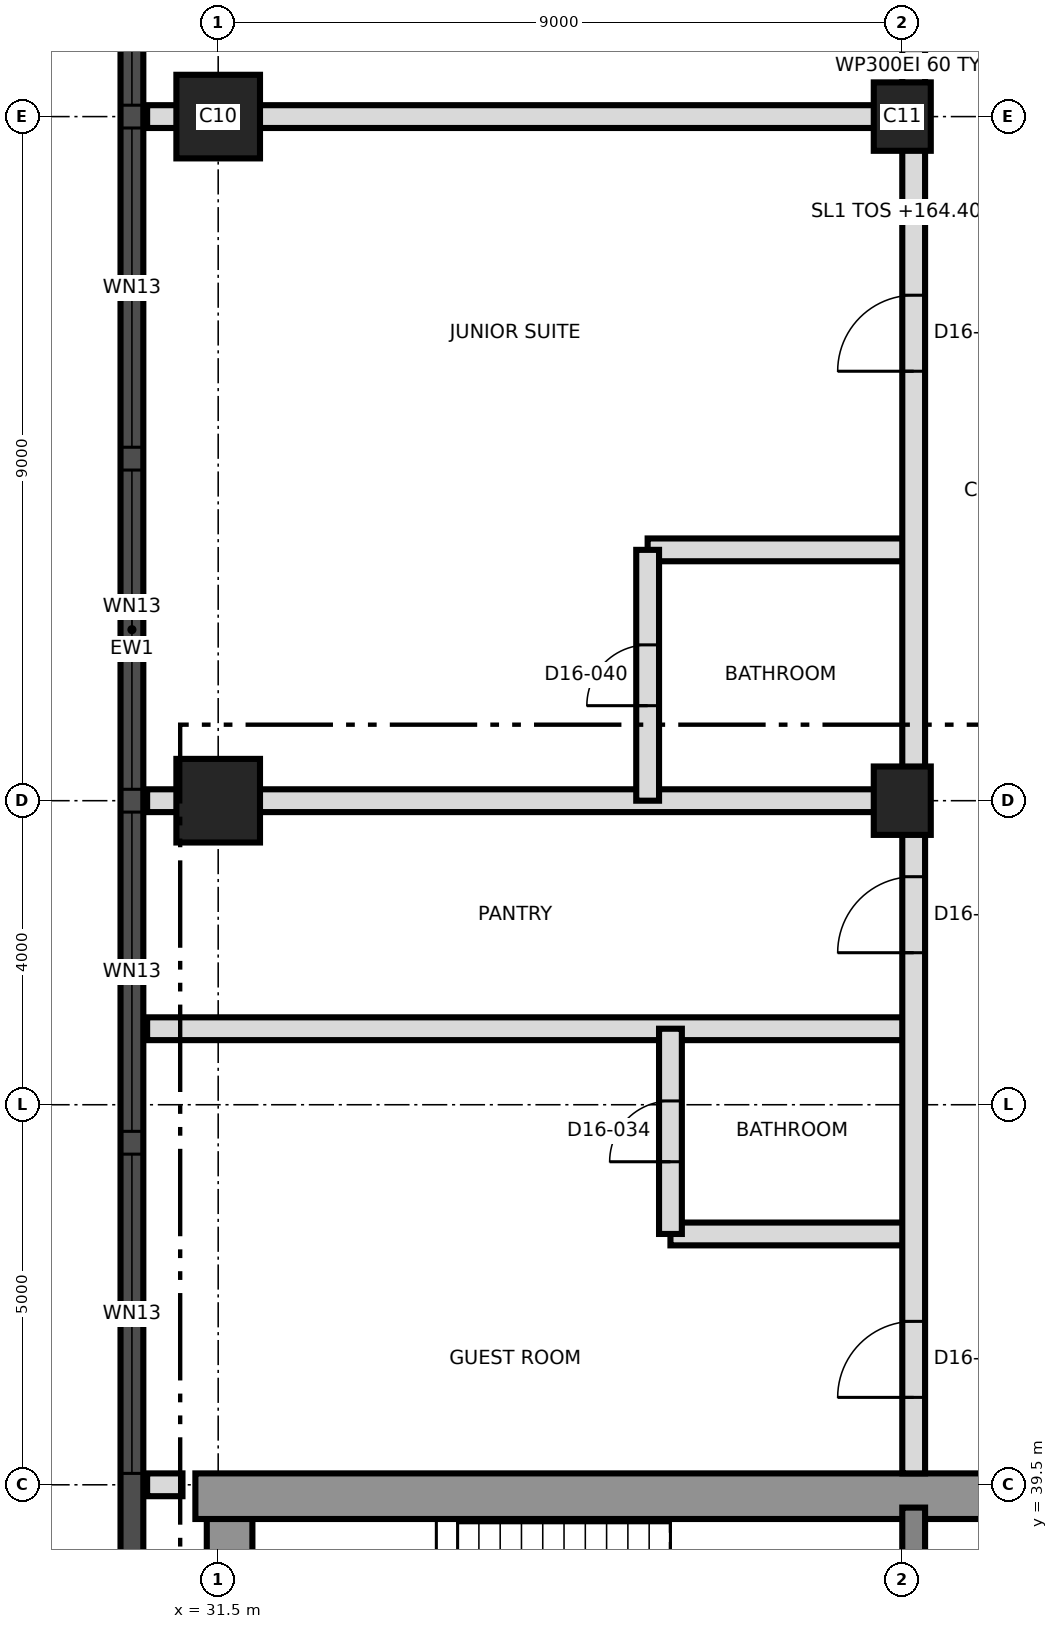
"""IFC4 building model, lengths in metres.
Left out: names, types, materials, properties, quantities, classifications, styles, units other than length and angle.
Written with IfcOpenShell. Run it as: python <this file> out.ifc"""

import sys

from ifc_helpers import new_model, si_unit, direction, frame, frame_2d, origin, origin_2d, place, context, subcontext, project, spatial, rectangle, extrude, element, fill, save


model = new_model("IFC4")
c1 = context("Model", 3, precision=1e-05, world=origin(), true_north=direction((0.0, 1.0)))
c2 = subcontext(c1, "Body", "Model", "MODEL_VIEW")
j1 = project(units=[si_unit("LENGTHUNIT", "METRE"), si_unit("PLANEANGLEUNIT", "RADIAN")], contexts=[c1])
p1 = place(None, origin())
s1 = spatial("IfcSite", under=j1, at=p1, CompositionType="ELEMENT")
p2 = place(p1, origin())
s2 = spatial("IfcBuilding", under=s1, at=p2, CompositionType="ELEMENT")
p3 = place(p2, frame((0.0, 0.0, 164.4)))
s3 = spatial("IfcBuildingStorey", under=s2, at=p3, CompositionType="ELEMENT", Elevation=164.4)
p4 = place(p3, frame((31.65, 21.8, 0.0), z_axis=(0.0, 0.0, 1.0), x_axis=(0.0, 1.0, 0.0)))
e1 = element("IfcWall", 1, at=p4, inside=s3, PredefinedType="SHEAR", context=c2, shape_type="SweptSolid", body=[
    extrude(rectangle(XDim=17.4, YDim=0.6, at=frame_2d((8.7, 0.0))), origin(), (0.0, 0.0, 1.0), 3.7),
])
p5 = place(p3, frame((31.2, 39.35, 0.0), z_axis=(0.0, 0.0, 1.0), x_axis=(1.0, 0.0, 0.0)))
e2 = element("IfcWall", 2, at=p5, inside=s3, PredefinedType="SHEAR", context=c2, shape_type="SweptSolid", body=[
    extrude(rectangle(XDim=27.0, YDim=0.6, at=frame_2d((13.5, 0.0))), origin(), (0.0, 0.0, 1.0), 3.7),
])
p6 = place(p5, frame((10.5, 0.0, 0.0)))
e3 = element("IfcOpeningElement", 3, at=p6, cuts=e2, PredefinedType="OPENING", context=c2, shape_type="SweptSolid", body=[
    extrude(rectangle(XDim=1.2, YDim=2.1, at=frame_2d((0.6, 1.05))), frame((0.0, 0.31, 0.0), z_axis=(0.0, -1.0, 0.0), x_axis=(1.0, 0.0, 0.0)), (0.0, 0.0, 1.0), 0.62),
])
p7 = place(p3, frame((40.65, 33.5, 0.0), z_axis=(0.0, 0.0, 1.0), x_axis=(0.0, 1.0, 0.0)))
e4 = element("IfcWall", 4, at=p7, inside=s3, PredefinedType="SHEAR", context=c2, shape_type="SweptSolid", body=[
    extrude(rectangle(XDim=5.7, YDim=0.3, at=frame_2d((2.85, 0.0))), origin(), (0.0, 0.0, 1.0), 3.7),
])
p8 = place(p3, frame((31.5, 48.5, 0.0), z_axis=(0.0, 0.0, 1.0), x_axis=(1.0, 0.0, 0.0)))
e5 = element("IfcColumn", 5, at=p8, inside=s3, PredefinedType="COLUMN", context=c2, shape_type="SweptSolid", body=[
    extrude(rectangle(XDim=1.1, YDim=1.1, at=origin_2d()), origin(), (0.0, 0.0, 1.0), 3.7),
])
p9 = place(p3, frame((40.5, 48.5, 0.0), z_axis=(0.0, 0.0, 1.0), x_axis=(0.0, 1.0, 0.0)))
e6 = element("IfcColumn", 6, at=p9, inside=s3, PredefinedType="COLUMN", context=c2, shape_type="SweptSolid", body=[
    extrude(rectangle(XDim=0.9, YDim=0.75, at=origin_2d()), origin(), (0.0, 0.0, 1.0), 3.7),
])
p10 = place(p3, frame((31.5, 57.5, 0.0), z_axis=(0.0, 0.0, 1.0), x_axis=(1.0, 0.0, 0.0)))
e7 = element("IfcColumn", 7, at=p10, inside=s3, PredefinedType="COLUMN", context=c2, shape_type="SweptSolid", body=[
    extrude(rectangle(XDim=1.1, YDim=1.1, at=origin_2d()), origin(), (0.0, 0.0, 1.0), 3.7),
])
p11 = place(p3, frame((40.5, 57.5, 0.0), z_axis=(0.0, 0.0, 1.0), x_axis=(0.0, 1.0, 0.0)))
e8 = element("IfcColumn", 8, at=p11, inside=s3, PredefinedType="COLUMN", context=c2, shape_type="SweptSolid", body=[
    extrude(rectangle(XDim=0.9, YDim=0.75, at=origin_2d()), origin(), (0.0, 0.0, 1.0), 3.7),
])
p12 = place(p3, frame((30.365, 66.992, 0.0), z_axis=(0.0, 0.0, 1.0), x_axis=(0.0, -1.0, 0.0)))
e9 = element("IfcWall", 9, at=p12, inside=s3, PredefinedType="SOLIDWALL", context=c2, shape_type="SweptSolid", body=[
    extrude(rectangle(XDim=32.981, YDim=0.3, at=frame_2d((16.491, 0.0))), origin(), (0.0, 0.0, 1.0), 3.4),
])
p13 = place(p12, frame((1.596, 0.0, 0.3)))
e10 = element("IfcOpeningElement", 10, at=p13, cuts=e9, PredefinedType="OPENING", context=c2, shape_type="SweptSolid", body=[
    extrude(rectangle(XDim=1.8, YDim=2.4, at=frame_2d((0.9, 1.2))), frame((0.0, 0.16, 0.0), z_axis=(0.0, -1.0, 0.0), x_axis=(1.0, 0.0, 0.0)), (0.0, 0.0, 1.0), 0.32),
])
p14 = place(p12, frame((5.142, 0.0, 0.9)))
e11 = element("IfcOpeningElement", 11, at=p14, cuts=e9, PredefinedType="OPENING", context=c2, shape_type="SweptSolid", body=[
    extrude(rectangle(XDim=4.2, YDim=1.7, at=frame_2d((2.1, 0.85))), frame((0.0, 0.16, 0.0), z_axis=(0.0, -1.0, 0.0), x_axis=(1.0, 0.0, 0.0)), (0.0, 0.0, 1.0), 0.32),
])
p15 = place(p12, frame((9.642, 0.0, 0.9)))
e12 = element("IfcOpeningElement", 12, at=p15, cuts=e9, PredefinedType="OPENING", context=c2, shape_type="SweptSolid", body=[
    extrude(rectangle(XDim=4.2, YDim=1.7, at=frame_2d((2.1, 0.85))), frame((0.0, 0.16, 0.0), z_axis=(0.0, -1.0, 0.0), x_axis=(1.0, 0.0, 0.0)), (0.0, 0.0, 1.0), 0.32),
])
p16 = place(p12, frame((14.142, 0.0, 0.9)))
e13 = element("IfcOpeningElement", 13, at=p16, cuts=e9, PredefinedType="OPENING", context=c2, shape_type="SweptSolid", body=[
    extrude(rectangle(XDim=4.2, YDim=1.7, at=frame_2d((2.1, 0.85))), frame((0.0, 0.16, 0.0), z_axis=(0.0, -1.0, 0.0), x_axis=(1.0, 0.0, 0.0)), (0.0, 0.0, 1.0), 0.32),
])
p17 = place(p12, frame((18.642, 0.0, 0.9)))
e14 = element("IfcOpeningElement", 14, at=p17, cuts=e9, PredefinedType="OPENING", context=c2, shape_type="SweptSolid", body=[
    extrude(rectangle(XDim=4.2, YDim=1.7, at=frame_2d((2.1, 0.85))), frame((0.0, 0.16, 0.0), z_axis=(0.0, -1.0, 0.0), x_axis=(1.0, 0.0, 0.0)), (0.0, 0.0, 1.0), 0.32),
])
p18 = place(p12, frame((23.142, 0.0, 0.9)))
e15 = element("IfcOpeningElement", 15, at=p18, cuts=e9, PredefinedType="OPENING", context=c2, shape_type="SweptSolid", body=[
    extrude(rectangle(XDim=4.2, YDim=1.7, at=frame_2d((2.1, 0.85))), frame((0.0, 0.16, 0.0), z_axis=(0.0, -1.0, 0.0), x_axis=(1.0, 0.0, 0.0)), (0.0, 0.0, 1.0), 0.32),
])
p19 = place(p12, frame((29.337, 0.0, 0.3)))
e16 = element("IfcOpeningElement", 16, at=p19, cuts=e9, PredefinedType="OPENING", context=c2, shape_type="SweptSolid", body=[
    extrude(rectangle(XDim=1.8, YDim=2.4, at=frame_2d((0.9, 1.2))), frame((0.0, 0.16, 0.0), z_axis=(0.0, -1.0, 0.0), x_axis=(1.0, 0.0, 0.0)), (0.0, 0.0, 1.0), 0.32),
])
p20 = place(p3, frame((30.565, 39.5, 0.0), z_axis=(0.0, 0.0, 1.0), x_axis=(1.0, 0.0, 0.0)))
e17 = element("IfcWall", 17, at=p20, inside=s3, PredefinedType="PARTITIONING", context=c2, shape_type="SweptSolid", body=[
    extrude(rectangle(XDim=0.465, YDim=0.3, at=frame_2d((0.232, 0.0))), origin(), (0.0, 0.0, 1.0), 3.4),
])
p21 = place(p3, frame((37.45, 42.8, 0.0), z_axis=(0.0, 0.0, 1.0), x_axis=(1.0, 0.0, 0.0)))
e18 = element("IfcWall", 18, at=p21, inside=s3, PredefinedType="PARTITIONING", context=c2, shape_type="SweptSolid", body=[
    extrude(rectangle(XDim=3.2, YDim=0.3, at=frame_2d((1.6, 0.0))), origin(), (0.0, 0.0, 1.0), 3.4),
])
for number, where, z_axis, x_axis in (
    (19, (30.565, 45.5, 0.0), (0.0, 0.0, 1.0), (1.0, 0.0, 0.0)),
    (20, (30.565, 48.5, 0.0), (0.0, 0.0, 1.0), (1.0, 0.0, 0.0)),
):
    element("IfcWall", number, at=place(p3, frame(where, z_axis=z_axis, x_axis=x_axis)), inside=s3, PredefinedType="PARTITIONING", context=c2, shape_type="SweptSolid", body=[
        extrude(rectangle(XDim=10.085, YDim=0.3, at=frame_2d((5.042, 0.0))), origin(), (0.0, 0.0, 1.0), 3.4),
    ])
p22 = place(p3, frame((37.15, 51.8, 0.0), z_axis=(0.0, 0.0, 1.0), x_axis=(1.0, 0.0, 0.0)))
e21 = element("IfcWall", 21, at=p22, inside=s3, PredefinedType="PARTITIONING", context=c2, shape_type="SweptSolid", body=[
    extrude(rectangle(XDim=3.5, YDim=0.3, at=frame_2d((1.75, 0.0))), origin(), (0.0, 0.0, 1.0), 3.4),
])
p23 = place(p3, frame((30.565, 57.5, 0.0), z_axis=(0.0, 0.0, 1.0), x_axis=(1.0, 0.0, 0.0)))
e22 = element("IfcWall", 22, at=p23, inside=s3, PredefinedType="PARTITIONING", context=c2, shape_type="SweptSolid", body=[
    extrude(rectangle(XDim=10.085, YDim=0.3, at=frame_2d((5.042, 0.0))), origin(), (0.0, 0.0, 1.0), 3.4),
])
p24 = place(p3, frame((37.15, 48.5, 0.0), z_axis=(0.0, 0.0, 1.0), x_axis=(0.0, 1.0, 0.0)))
e23 = element("IfcWall", 23, at=p24, inside=s3, PredefinedType="PARTITIONING", context=c2, shape_type="SweptSolid", body=[
    extrude(rectangle(XDim=3.3, YDim=0.3, at=frame_2d((1.65, 0.0))), origin(), (0.0, 0.0, 1.0), 3.4),
])
p25 = place(p24, frame((1.25, 0.0, 0.0)))
e24 = element("IfcOpeningElement", 24, at=p25, cuts=e23, PredefinedType="OPENING", context=c2, shape_type="SweptSolid", body=[
    extrude(rectangle(XDim=0.8, YDim=2.1, at=frame_2d((0.4, 1.05))), frame((0.0, 0.16, 0.0), z_axis=(0.0, -1.0, 0.0), x_axis=(1.0, 0.0, 0.0)), (0.0, 0.0, 1.0), 0.32),
])
p26 = place(p3, frame((37.45, 42.8, 0.0), z_axis=(0.0, 0.0, 1.0), x_axis=(0.0, 1.0, 0.0)))
e25 = element("IfcWall", 25, at=p26, inside=s3, PredefinedType="PARTITIONING", context=c2, shape_type="SweptSolid", body=[
    extrude(rectangle(XDim=2.7, YDim=0.3, at=frame_2d((1.35, 0.0))), origin(), (0.0, 0.0, 1.0), 3.4),
])
p27 = place(p26, frame((0.95, 0.0, 0.0)))
e26 = element("IfcOpeningElement", 26, at=p27, cuts=e25, PredefinedType="OPENING", context=c2, shape_type="SweptSolid", body=[
    extrude(rectangle(XDim=0.8, YDim=2.1, at=frame_2d((0.4, 1.05))), frame((0.0, 0.16, 0.0), z_axis=(0.0, -1.0, 0.0), x_axis=(1.0, 0.0, 0.0)), (0.0, 0.0, 1.0), 0.32),
])
p28 = place(p3, frame((40.65, 39.65, 0.0), z_axis=(0.0, 0.0, 1.0), x_axis=(0.0, 1.0, 0.0)))
e27 = element("IfcWall", 27, at=p28, inside=s3, PredefinedType="PARTITIONING", context=c2, shape_type="SweptSolid", body=[
    extrude(rectangle(XDim=37.025, YDim=0.3, at=frame_2d((18.513, 0.0))), origin(), (0.0, 0.0, 1.0), 3.4),
])
p29 = place(p28, frame((1.0, 0.0, 0.0)))
e28 = element("IfcOpeningElement", 28, at=p29, cuts=e27, PredefinedType="OPENING", context=c2, shape_type="SweptSolid", body=[
    extrude(rectangle(XDim=1.0, YDim=2.1, at=frame_2d((0.5, 1.05))), frame((0.0, 0.16, 0.0), z_axis=(0.0, -1.0, 0.0), x_axis=(1.0, 0.0, 0.0)), (0.0, 0.0, 1.0), 0.32),
])
p30 = place(p28, frame((6.85, 0.0, 0.0)))
e29 = element("IfcOpeningElement", 29, at=p30, cuts=e27, PredefinedType="OPENING", context=c2, shape_type="SweptSolid", body=[
    extrude(rectangle(XDim=1.0, YDim=2.1, at=frame_2d((0.5, 1.05))), frame((0.0, 0.16, 0.0), z_axis=(0.0, -1.0, 0.0), x_axis=(1.0, 0.0, 0.0)), (0.0, 0.0, 1.0), 0.32),
])
p31 = place(p28, frame((14.5, 0.0, 0.0)))
e30 = element("IfcOpeningElement", 30, at=p31, cuts=e27, PredefinedType="OPENING", context=c2, shape_type="SweptSolid", body=[
    extrude(rectangle(XDim=1.0, YDim=2.4, at=frame_2d((0.5, 1.2))), frame((0.0, 0.16, 0.0), z_axis=(0.0, -1.0, 0.0), x_axis=(1.0, 0.0, 0.0)), (0.0, 0.0, 1.0), 0.32),
])
p32 = place(p28, frame((21.35, 0.0, 0.0)))
e31 = element("IfcOpeningElement", 31, at=p32, cuts=e27, PredefinedType="OPENING", context=c2, shape_type="SweptSolid", body=[
    extrude(rectangle(XDim=1.0, YDim=2.4, at=frame_2d((0.5, 1.2))), frame((0.0, 0.16, 0.0), z_axis=(0.0, -1.0, 0.0), x_axis=(1.0, 0.0, 0.0)), (0.0, 0.0, 1.0), 0.32),
])
p33 = place(p14, origin())
e32 = element("IfcWindow", 32, at=p33, inside=s3, PartitioningType="SINGLE_PANEL", PredefinedType="WINDOW", context=c2, shape_type="SweptSolid", body=[
    extrude(rectangle(XDim=4.2, YDim=1.7, at=frame_2d((2.1, 0.85))), frame((0.0, 0.03, 0.0), z_axis=(0.0, -1.0, 0.0), x_axis=(1.0, 0.0, 0.0)), (0.0, 0.0, 1.0), 0.06),
])
fill(e11, e32)
p34 = place(p15, origin())
e33 = element("IfcWindow", 33, at=p34, inside=s3, PartitioningType="SINGLE_PANEL", PredefinedType="WINDOW", context=c2, shape_type="SweptSolid", body=[
    extrude(rectangle(XDim=4.2, YDim=1.7, at=frame_2d((2.1, 0.85))), frame((0.0, 0.03, 0.0), z_axis=(0.0, -1.0, 0.0), x_axis=(1.0, 0.0, 0.0)), (0.0, 0.0, 1.0), 0.06),
])
fill(e12, e33)
p35 = place(p16, origin())
e34 = element("IfcWindow", 34, at=p35, inside=s3, PartitioningType="SINGLE_PANEL", PredefinedType="WINDOW", context=c2, shape_type="SweptSolid", body=[
    extrude(rectangle(XDim=4.2, YDim=1.7, at=frame_2d((2.1, 0.85))), frame((0.0, 0.03, 0.0), z_axis=(0.0, -1.0, 0.0), x_axis=(1.0, 0.0, 0.0)), (0.0, 0.0, 1.0), 0.06),
])
fill(e13, e34)
p36 = place(p17, origin())
e35 = element("IfcWindow", 35, at=p36, inside=s3, PartitioningType="SINGLE_PANEL", PredefinedType="WINDOW", context=c2, shape_type="SweptSolid", body=[
    extrude(rectangle(XDim=4.2, YDim=1.7, at=frame_2d((2.1, 0.85))), frame((0.0, 0.03, 0.0), z_axis=(0.0, -1.0, 0.0), x_axis=(1.0, 0.0, 0.0)), (0.0, 0.0, 1.0), 0.06),
])
fill(e14, e35)
p37 = place(p18, origin())
e36 = element("IfcWindow", 36, at=p37, inside=s3, PartitioningType="SINGLE_PANEL", PredefinedType="WINDOW", context=c2, shape_type="SweptSolid", body=[
    extrude(rectangle(XDim=4.2, YDim=1.7, at=frame_2d((2.1, 0.85))), frame((0.0, 0.03, 0.0), z_axis=(0.0, -1.0, 0.0), x_axis=(1.0, 0.0, 0.0)), (0.0, 0.0, 1.0), 0.06),
])
fill(e15, e36)
p38 = place(p27, origin())
e37 = element("IfcDoor", 37, at=p38, inside=s3, OperationType="SINGLE_SWING_LEFT", PredefinedType="DOOR", context=c2, shape_type="SweptSolid", body=[
    extrude(rectangle(XDim=0.8, YDim=2.1, at=frame_2d((0.4, 1.05))), frame((0.0, 0.025, 0.0), z_axis=(0.0, -1.0, 0.0), x_axis=(1.0, 0.0, 0.0)), (0.0, 0.0, 1.0), 0.05),
])
fill(e26, e37)
p39 = place(p29, origin())
e38 = element("IfcDoor", 38, at=p39, inside=s3, OperationType="SINGLE_SWING_RIGHT", PredefinedType="DOOR", context=c2, shape_type="SweptSolid", body=[
    extrude(rectangle(XDim=1.0, YDim=2.1, at=frame_2d((0.5, 1.05))), frame((0.0, 0.025, 0.0), z_axis=(0.0, -1.0, 0.0), x_axis=(1.0, 0.0, 0.0)), (0.0, 0.0, 1.0), 0.05),
])
fill(e28, e38)
p40 = place(p30, origin())
e39 = element("IfcDoor", 39, at=p40, inside=s3, OperationType="SINGLE_SWING_LEFT", PredefinedType="DOOR", context=c2, shape_type="SweptSolid", body=[
    extrude(rectangle(XDim=1.0, YDim=2.1, at=frame_2d((0.5, 1.05))), frame((0.0, 0.025, 0.0), z_axis=(0.0, -1.0, 0.0), x_axis=(1.0, 0.0, 0.0)), (0.0, 0.0, 1.0), 0.05),
])
fill(e29, e39)
p41 = place(p25, origin())
e40 = element("IfcDoor", 40, at=p41, inside=s3, OperationType="SINGLE_SWING_LEFT", PredefinedType="DOOR", context=c2, shape_type="SweptSolid", body=[
    extrude(rectangle(XDim=0.8, YDim=2.1, at=frame_2d((0.4, 1.05))), frame((0.0, 0.025, 0.0), z_axis=(0.0, -1.0, 0.0), x_axis=(1.0, 0.0, 0.0)), (0.0, 0.0, 1.0), 0.05),
])
fill(e24, e40)
p42 = place(p31, origin())
e41 = element("IfcDoor", 41, at=p42, inside=s3, OperationType="SINGLE_SWING_RIGHT", PredefinedType="DOOR", context=c2, shape_type="SweptSolid", body=[
    extrude(rectangle(XDim=1.0, YDim=2.4, at=frame_2d((0.5, 1.2))), frame((0.0, 0.025, 0.0), z_axis=(0.0, -1.0, 0.0), x_axis=(1.0, 0.0, 0.0)), (0.0, 0.0, 1.0), 0.05),
])
fill(e30, e41)
save(model, sys.argv[1])
